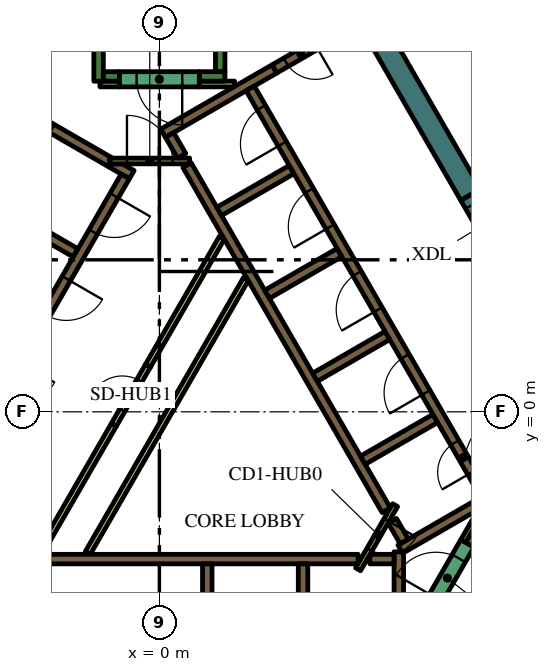
"""IFC4 building model, lengths in metres.
Left out: names, types, materials, properties, quantities, classifications, styles, units other than length and angle.
Written with IfcOpenShell. Run it as: python <this file> out.ifc"""

import sys

from ifc_helpers import new_model, si_unit, direction, frame, frame_2d, origin, place, context, subcontext, project, spatial, polyline, rectangle, outline, extrude, element, fill, save


model = new_model("IFC4")
c1 = context("Model", 3, precision=1e-05, world=origin(), true_north=direction((0.0, 1.0)))
c2 = subcontext(c1, "Body", "Model", "MODEL_VIEW")
j1 = project(units=[si_unit("LENGTHUNIT", "METRE"), si_unit("PLANEANGLEUNIT", "RADIAN")], contexts=[c1])
p1 = place(None, origin())
s1 = spatial("IfcSite", under=j1, at=p1, CompositionType="ELEMENT")
p2 = place(p1, origin())
s2 = spatial("IfcBuilding", under=s1, at=p2, CompositionType="ELEMENT")
p3 = place(p2, frame((0.0, 0.0, 304.8)))
s3 = spatial("IfcBuildingStorey", under=s2, at=p3, CompositionType="ELEMENT", Elevation=304.8)
p4 = place(p3, frame((8.192, 5.711, 0.0), z_axis=(0.0, 0.0, 1.0), x_axis=(-0.500006836656, 0.866021456604, 0.0)))
e1 = element("IfcWall", 1, at=p4, inside=s3, PredefinedType="SOLIDWALL", context=c2, shape_type="SweptSolid", body=[
    extrude(rectangle(XDim=5.078, YDim=0.6, at=frame_2d((2.539, 0.0))), origin(), (0.0, 0.0, 1.0), 4.2),
])
p5 = place(p3, frame((8.168, -3.503, 0.0), z_axis=(0.0, 0.0, 1.0), x_axis=(0.49972245349, 0.866185586049, 0.0)))
e2 = element("IfcWall", 2, at=p5, inside=s3, PredefinedType="SOLIDWALL", context=c2, shape_type="SweptSolid", body=[
    extrude(rectangle(XDim=0.425, YDim=0.25, at=frame_2d((0.212, 0.0))), origin(), (0.0, 0.0, 1.0), 4.2),
])
p6 = place(p3, frame((1.6, 8.95, 0.0), z_axis=(0.0, 0.0, 1.0), x_axis=(0.0, 1.0, 0.0)))
e3 = element("IfcWall", 3, at=p6, inside=s3, PredefinedType="SOLIDWALL", context=c2, shape_type="SweptSolid", body=[
    extrude(rectangle(XDim=6.8, YDim=0.25, at=frame_2d((3.4, 0.0))), origin(), (0.0, 0.0, 1.0), 4.2),
])
p7 = place(p3, frame((1.05, 8.825, 0.0), z_axis=(0.0, 0.0, 1.0), x_axis=(1.0, 0.0, 0.0)))
e4 = element("IfcWall", 4, at=p7, inside=s3, PredefinedType="SOLIDWALL", context=c2, shape_type="SweptSolid", body=[
    extrude(rectangle(XDim=0.675, YDim=0.25, at=frame_2d((0.337, 0.0))), origin(), (0.0, 0.0, 1.0), 4.2),
])
p8 = place(p3, frame((-1.6, 8.7, 0.0), z_axis=(0.0, 0.0, 1.0), x_axis=(0.0, 1.0, 0.0)))
e5 = element("IfcWall", 5, at=p8, inside=s3, PredefinedType="SOLIDWALL", context=c2, shape_type="SweptSolid", body=[
    extrude(rectangle(XDim=7.05, YDim=0.25, at=frame_2d((3.525, 0.0))), origin(), (0.0, 0.0, 1.0), 4.2),
])
p9 = place(p3, frame((-1.475, 8.825, 0.0), z_axis=(0.0, 0.0, 1.0), x_axis=(1.0, 0.0, 0.0)))
e6 = element("IfcWall", 6, at=p9, inside=s3, PredefinedType="SOLIDWALL", context=c2, shape_type="SweptSolid", body=[
    extrude(rectangle(XDim=0.425, YDim=0.25, at=frame_2d((0.212, 0.0))), origin(), (0.0, 0.0, 1.0), 4.2),
])
p10 = place(p3, frame((6.3, -7.24, 0.0), z_axis=(0.0, 0.0, 1.0), x_axis=(0.0, 1.0, 0.0)))
e7 = element("IfcWall", 7, at=p10, inside=s3, PredefinedType="SOLIDWALL", context=c2, shape_type="SweptSolid", body=[
    extrude(rectangle(XDim=3.556, YDim=0.25, at=frame_2d((1.778, 0.0))), origin(), (0.0, 0.0, 1.0), 4.2),
])
p11 = place(p3, frame((5.538, -3.875, 0.0), z_axis=(0.0, 0.0, 1.0), x_axis=(1.0, 0.0, 0.0)))
e8 = element("IfcWall", 8, at=p11, inside=s3, PredefinedType="SOLIDWALL", context=c2, shape_type="SweptSolid", body=[
    extrude(rectangle(XDim=0.637, YDim=0.25, at=frame_2d((0.318, 0.0))), origin(), (0.0, 0.0, 1.0), 4.2),
])
p12 = place(p3, frame((-5.259, -3.875, 0.0), z_axis=(0.0, 0.0, 1.0), x_axis=(1.0, 0.0, 0.0)))
e9 = element("IfcWall", 9, at=p12, inside=s3, PredefinedType="SOLIDWALL", context=c2, shape_type="SweptSolid", body=[
    extrude(rectangle(XDim=10.489, YDim=0.25, at=frame_2d((5.244, 0.0))), origin(), (0.0, 0.0, 1.0), 4.2),
])
for number, where, z_axis, x_axis in (
    (10, (1.26, -4.0, 0.0), (0.0, 0.0, 1.0), (0.0, -1.0, 0.0)),
    (11, (3.78, -4.0, 0.0), (0.0, 0.0, 1.0), (0.0, -1.0, 0.0)),
):
    element("IfcWall", number, at=place(p3, frame(where, z_axis=z_axis, x_axis=x_axis)), inside=s3, PredefinedType="SOLIDWALL", context=c2, shape_type="SweptSolid", body=[
        extrude(rectangle(XDim=2.2, YDim=0.25, at=frame_2d((1.1, 0.0))), origin(), (0.0, 0.0, 1.0), 4.2),
    ])
p13 = place(p3, frame((9.19, -1.969, 0.0), z_axis=(0.0, 0.0, 1.0), x_axis=(-0.866057109641, -0.499945079824, 0.0)))
e12 = element("IfcWall", 12, at=p13, inside=s3, PredefinedType="SOLIDWALL", context=c2, shape_type="SweptSolid", body=[
    extrude(rectangle(XDim=3.291, YDim=0.25, at=frame_2d((1.646, 0.0))), origin(), (0.0, 0.0, 1.0), 4.2),
])
p14 = place(p3, frame((6.13, -2.867, 0.0), z_axis=(0.0, 0.0, 1.0), x_axis=(0.500160776593, -0.865932559475, 0.0)))
e13 = element("IfcWall", 13, at=p14, inside=s3, PredefinedType="SOLIDWALL", context=c2, shape_type="SweptSolid", body=[
    extrude(rectangle(XDim=0.627, YDim=0.25, at=frame_2d((0.313, 0.0))), origin(), (0.0, 0.0, 1.0), 4.2),
])
p15 = place(p3, frame((3.028, 9.023, 0.0), z_axis=(0.0, 0.0, 1.0), x_axis=(-0.866036587186, -0.49998062928, 0.0)))
e14 = element("IfcWall", 14, at=p15, inside=s3, PredefinedType="SOLIDWALL", context=c2, shape_type="SweptSolid", body=[
    extrude(rectangle(XDim=3.384, YDim=0.25, at=frame_2d((1.692, 0.0))), origin(), (0.0, 0.0, 1.0), 4.2),
])
p16 = place(p3, frame((0.268, 7.285, 0.0), z_axis=(0.0, 0.0, 1.0), x_axis=(0.500098681536, -0.865968422476, 0.0)))
e15 = element("IfcWall", 15, at=p16, inside=s3, PredefinedType="SOLIDWALL", context=c2, shape_type="SweptSolid", body=[
    extrude(rectangle(XDim=0.636, YDim=0.25, at=frame_2d((0.318, 0.0))), origin(), (0.0, 0.0, 1.0), 4.2),
])
p17 = place(p3, frame((5.97, -2.591, 0.0), z_axis=(0.0, 0.0, 1.0), x_axis=(-0.499994469932, 0.866028596547, 0.0)))
e16 = element("IfcWall", 16, at=p17, inside=s3, PredefinedType="SOLIDWALL", context=c2, shape_type="SweptSolid", body=[
    extrude(rectangle(XDim=10.488, YDim=0.25, at=frame_2d((5.244, 0.0))), origin(), (0.0, 0.0, 1.0), 4.2),
])
p18 = place(p3, frame((1.574, 5.274, 0.0), z_axis=(0.0, 0.0, 1.0), x_axis=(0.866028486751, 0.499994660107, 0.0)))
e17 = element("IfcWall", 17, at=p18, inside=s3, PredefinedType="SOLIDWALL", context=c2, shape_type="SweptSolid", body=[
    extrude(rectangle(XDim=2.2, YDim=0.25, at=frame_2d((1.1, 0.0))), origin(), (0.0, 0.0, 1.0), 4.2),
])
for number, where, z_axis, x_axis in (
    (18, (2.834, 3.091, 0.0), (0.0, 0.0, 1.0), (0.866, 0.5, 0.0)),
    (19, (4.094, 0.909, 0.0), (0.0, 0.0, 1.0), (0.866, 0.5, 0.0)),
    (20, (5.354, -1.274, 0.0), (0.0, 0.0, 1.0), (0.866, 0.5, 0.0)),
):
    element("IfcWall", number, at=place(p3, frame(where, z_axis=z_axis, x_axis=x_axis)), inside=s3, PredefinedType="SOLIDWALL", context=c2, shape_type="SweptSolid", body=[
        extrude(rectangle(XDim=2.2, YDim=0.25, at=frame_2d((1.1, 0.0))), origin(), (0.0, 0.0, 1.0), 4.2),
    ])
p19 = place(p3, frame((-8.06, -1.311, 0.0), z_axis=(0.0, 0.0, 1.0), x_axis=(0.50000273126, 0.866023826885, 0.0)))
e21 = element("IfcWall", 21, at=p19, inside=s3, PredefinedType="SOLIDWALL", context=c2, shape_type="SweptSolid", body=[
    extrude(rectangle(XDim=10.33, YDim=0.25, at=frame_2d((5.165, 0.0))), origin(), (0.0, 0.0, 1.0), 4.2),
])
p20 = place(p3, origin())
e22 = element("IfcWall", 22, at=p20, inside=s3, PredefinedType="SOLIDWALL", context=c2, shape_type="SweptSolid", body=[
    extrude(outline(polyline([(-2.912, 7.356), (-2.787, 7.573), (-1.232, 6.675), (-1.303, 6.675), (-1.304, 6.675), (-1.304, 6.675), (-1.304, 6.525), (-1.304, 6.525), (-1.303, 6.525), (-0.971, 6.525), (-0.665, 6.348), (-0.79, 6.132), (-1.007, 6.257), (-1.007, 6.257), (-2.912, 7.356)])), origin(), (0.0, 0.0, 1.0), 4.2),
])
p21 = place(p3, frame((-2.204, 4.182, 0.0), z_axis=(0.0, 0.0, 1.0), x_axis=(-0.866008176907, 0.50002983664, 0.0)))
e23 = element("IfcWall", 23, at=p21, inside=s3, PredefinedType="SOLIDWALL", context=c2, shape_type="SweptSolid", body=[
    extrude(rectangle(XDim=2.2, YDim=0.25, at=frame_2d((1.1, 0.0))), origin(), (0.0, 0.0, 1.0), 4.2),
])
p22 = place(p3, frame((1.05, 8.625, 0.0), z_axis=(0.0, 0.0, 1.0), x_axis=(1.0, 0.0, 0.0)))
e24 = element("IfcWall", 24, at=p22, inside=s3, PredefinedType="PARTITIONING", context=c2, shape_type="SweptSolid", body=[
    extrude(rectangle(XDim=0.929, YDim=0.15, at=frame_2d((0.464, 0.0))), origin(), (0.0, 0.0, 1.0), 3.55),
])
p23 = place(p3, frame((-1.564, 8.625, 0.0), z_axis=(0.0, 0.0, 1.0), x_axis=(1.0, 0.0, 0.0)))
e25 = element("IfcWall", 25, at=p23, inside=s3, PredefinedType="PARTITIONING", context=c2, shape_type="SweptSolid", body=[
    extrude(rectangle(XDim=0.514, YDim=0.15, at=frame_2d((0.257, 0.0))), origin(), (0.0, 0.0, 1.0), 3.55),
])
p24 = place(p3, frame((8.459, -2.599, 0.0), z_axis=(0.0, 0.0, 1.0), x_axis=(-0.500041054325, -0.866001699761, 0.0)))
e26 = element("IfcWall", 26, at=p24, inside=s3, PredefinedType="PARTITIONING", context=c2, shape_type="SweptSolid", body=[
    extrude(rectangle(XDim=0.929, YDim=0.15, at=frame_2d((0.464, 0.0))), origin(), (0.0, 0.0, 1.0), 4.2),
])
p25 = place(p3, frame((-1.887, -3.718, 0.0), z_axis=(0.0, 0.0, 1.0), x_axis=(0.500005008002, 0.866022512394, 0.0)))
e27 = element("IfcWall", 27, at=p25, inside=s3, PredefinedType="PARTITIONING", context=c2, shape_type="SweptSolid", body=[
    extrude(rectangle(XDim=8.327, YDim=0.15, at=frame_2d((4.164, 0.0))), origin(), (0.0, 0.0, 1.0), 3.55),
])
p26 = place(p3, frame((-3.147, -3.718, 0.0), z_axis=(0.0, 0.0, 1.0), x_axis=(0.500010131483, 0.866019554291, 0.0)))
e28 = element("IfcWall", 28, at=p26, inside=s3, PredefinedType="PARTITIONING", context=c2, shape_type="SweptSolid", body=[
    extrude(rectangle(XDim=3.894, YDim=0.15, at=frame_2d((1.947, 0.0))), origin(), (0.0, 0.0, 1.0), 3.55),
])
p27 = place(p3, frame((-0.3, 1.212, 0.0), z_axis=(0.0, 0.0, 1.0), x_axis=(0.499963101113, 0.866046706318, 0.0)))
e29 = element("IfcWall", 29, at=p27, inside=s3, PredefinedType="PARTITIONING", context=c2, shape_type="SweptSolid", body=[
    extrude(rectangle(XDim=3.893, YDim=0.15, at=frame_2d((1.947, 0.0))), origin(), (0.0, 0.0, 1.0), 3.55),
])
p28 = place(p3, frame((8.565, -2.185, 0.0), z_axis=(0.0, 0.0, 1.0), x_axis=(-0.499997954832, 0.866026584559, 0.0)))
e30 = element("IfcWall", 30, at=p28, inside=s3, PredefinedType="SOLIDWALL", context=c2, shape_type="SweptSolid", body=[
    extrude(rectangle(XDim=12.35, YDim=0.25, at=frame_2d((6.175, 0.0))), origin(), (0.0, 0.0, 1.0), 4.2),
])
p29 = place(p28, frame((0.685, 0.0, 0.0)))
e31 = element("IfcOpeningElement", 31, at=p29, cuts=e30, PredefinedType="OPENING", context=c2, shape_type="SweptSolid", body=[
    extrude(rectangle(XDim=0.9, YDim=2.1, at=frame_2d((0.45, 1.05))), frame((0.0, 0.135, 0.0), z_axis=(0.0, -1.0, 0.0), x_axis=(1.0, 0.0, 0.0)), (0.0, 0.0, 1.0), 0.27),
])
p30 = place(p28, frame((3.105, 0.0, 0.0)))
e32 = element("IfcOpeningElement", 32, at=p30, cuts=e30, PredefinedType="OPENING", context=c2, shape_type="SweptSolid", body=[
    extrude(rectangle(XDim=1.1, YDim=2.1, at=frame_2d((0.55, 1.05))), frame((0.0, 0.135, 0.0), z_axis=(0.0, -1.0, 0.0), x_axis=(1.0, 0.0, 0.0)), (0.0, 0.0, 1.0), 0.27),
])
p31 = place(p28, frame((5.625, 0.0, 0.0)))
e33 = element("IfcOpeningElement", 33, at=p31, cuts=e30, PredefinedType="OPENING", context=c2, shape_type="SweptSolid", body=[
    extrude(rectangle(XDim=1.1, YDim=2.1, at=frame_2d((0.55, 1.05))), frame((0.0, 0.135, 0.0), z_axis=(0.0, -1.0, 0.0), x_axis=(1.0, 0.0, 0.0)), (0.0, 0.0, 1.0), 0.27),
])
p32 = place(p28, frame((8.145, 0.0, 0.0)))
e34 = element("IfcOpeningElement", 34, at=p32, cuts=e30, PredefinedType="OPENING", context=c2, shape_type="SweptSolid", body=[
    extrude(rectangle(XDim=1.1, YDim=2.1, at=frame_2d((0.55, 1.05))), frame((0.0, 0.135, 0.0), z_axis=(0.0, -1.0, 0.0), x_axis=(1.0, 0.0, 0.0)), (0.0, 0.0, 1.0), 0.27),
])
p33 = place(p28, frame((10.665, 0.0, 0.0)))
e35 = element("IfcOpeningElement", 35, at=p33, cuts=e30, PredefinedType="OPENING", context=c2, shape_type="SweptSolid", body=[
    extrude(rectangle(XDim=1.1, YDim=2.1, at=frame_2d((0.55, 1.05))), frame((0.0, 0.135, 0.0), z_axis=(0.0, -1.0, 0.0), x_axis=(1.0, 0.0, 0.0)), (0.0, 0.0, 1.0), 0.27),
])
p34 = place(p3, frame((-0.898, 6.194, 0.0), z_axis=(0.0, 0.0, 1.0), x_axis=(-0.499996202215, -0.866027596426, 0.0)))
e36 = element("IfcWall", 36, at=p34, inside=s3, PredefinedType="SOLIDWALL", context=c2, shape_type="SweptSolid", body=[
    extrude(rectangle(XDim=9.83, YDim=0.25, at=frame_2d((4.915, 0.0))), origin(), (0.0, 0.0, 1.0), 4.2),
])
p35 = place(p34, frame((0.585, 0.0, 0.0)))
e37 = element("IfcOpeningElement", 37, at=p35, cuts=e36, PredefinedType="OPENING", context=c2, shape_type="SweptSolid", body=[
    extrude(rectangle(XDim=1.1, YDim=2.1, at=frame_2d((0.55, 1.05))), frame((0.0, 0.135, 0.0), z_axis=(0.0, -1.0, 0.0), x_axis=(1.0, 0.0, 0.0)), (0.0, 0.0, 1.0), 0.27),
])
p36 = place(p34, frame((3.105, 0.0, 0.0)))
e38 = element("IfcOpeningElement", 38, at=p36, cuts=e36, PredefinedType="OPENING", context=c2, shape_type="SweptSolid", body=[
    extrude(rectangle(XDim=1.1, YDim=2.1, at=frame_2d((0.55, 1.05))), frame((0.0, 0.135, 0.0), z_axis=(0.0, -1.0, 0.0), x_axis=(1.0, 0.0, 0.0)), (0.0, 0.0, 1.0), 0.27),
])
p37 = place(p34, frame((5.625, 0.0, 0.0)))
e39 = element("IfcOpeningElement", 39, at=p37, cuts=e36, PredefinedType="OPENING", context=c2, shape_type="SweptSolid", body=[
    extrude(rectangle(XDim=1.1, YDim=2.1, at=frame_2d((0.55, 1.05))), frame((0.0, 0.135, 0.0), z_axis=(0.0, -1.0, 0.0), x_axis=(1.0, 0.0, 0.0)), (0.0, 0.0, 1.0), 0.27),
])
p38 = place(p34, frame((8.145, 0.0, 0.0)))
e40 = element("IfcOpeningElement", 40, at=p38, cuts=e36, PredefinedType="OPENING", context=c2, shape_type="SweptSolid", body=[
    extrude(rectangle(XDim=1.1, YDim=2.1, at=frame_2d((0.55, 1.05))), frame((0.0, 0.135, 0.0), z_axis=(0.0, -1.0, 0.0), x_axis=(1.0, 0.0, 0.0)), (0.0, 0.0, 1.0), 0.27),
])
p39 = place(p3, frame((7.053, -5.284, 0.0), z_axis=(0.0, 0.0, 1.0), x_axis=(0.500078061341, 0.865980330357, 0.0)))
e41 = element("IfcWall", 41, at=p39, inside=s3, PredefinedType="SOLIDWALL", context=c2, shape_type="SweptSolid", body=[
    extrude(rectangle(XDim=2.1, YDim=0.4, at=frame_2d((1.05, 0.0))), origin(), (0.0, 0.0, 1.0), 4.2),
])
p40 = place(p39, frame((0.45, 0.0, 0.0)))
e42 = element("IfcOpeningElement", 42, at=p40, cuts=e41, PredefinedType="OPENING", context=c2, shape_type="SweptSolid", body=[
    extrude(rectangle(XDim=1.2, YDim=2.1, at=frame_2d((0.6, 1.05))), frame((0.0, 0.21, 0.0), z_axis=(0.0, -1.0, 0.0), x_axis=(1.0, 0.0, 0.0)), (0.0, 0.0, 1.0), 0.42),
])
p41 = place(p3, frame((1.05, 8.75, 0.0), z_axis=(0.0, 0.0, 1.0), x_axis=(-1.0, 0.0, 0.0)))
e43 = element("IfcWall", 43, at=p41, inside=s3, PredefinedType="SOLIDWALL", context=c2, shape_type="SweptSolid", body=[
    extrude(rectangle(XDim=2.1, YDim=0.4, at=frame_2d((1.05, 0.0))), origin(), (0.0, 0.0, 1.0), 4.2),
])
p42 = place(p41, frame((0.45, 0.0, 0.0)))
e44 = element("IfcOpeningElement", 44, at=p42, cuts=e43, PredefinedType="OPENING", context=c2, shape_type="SweptSolid", body=[
    extrude(rectangle(XDim=1.2, YDim=2.1, at=frame_2d((0.6, 1.05))), frame((0.0, 0.21, 0.0), z_axis=(0.0, -1.0, 0.0), x_axis=(1.0, 0.0, 0.0)), (0.0, 0.0, 1.0), 0.42),
])
p43 = place(p3, frame((5.366, 10.373, 0.0), z_axis=(0.0, 0.0, 1.0), x_axis=(-0.866019956843, -0.50000943426, 0.0)))
e45 = element("IfcWall", 45, at=p43, inside=s3, PredefinedType="SOLIDWALL", context=c2, shape_type="SweptSolid", body=[
    extrude(rectangle(XDim=2.7, YDim=0.25, at=frame_2d((1.35, 0.0))), origin(), (0.0, 0.0, 1.0), 4.2),
])
p44 = place(p43, frame((1.45, 0.0, 0.0)))
e46 = element("IfcOpeningElement", 46, at=p44, cuts=e45, PredefinedType="OPENING", context=c2, shape_type="SweptSolid", body=[
    extrude(rectangle(XDim=0.9, YDim=2.1, at=frame_2d((0.45, 1.05))), frame((0.0, 0.135, 0.0), z_axis=(0.0, -1.0, 0.0), x_axis=(1.0, 0.0, 0.0)), (0.0, 0.0, 1.0), 0.27),
])
p45 = place(p3, frame((6.203, -2.456, 0.0), z_axis=(0.0, 0.0, 1.0), x_axis=(-0.500043961785, -0.866000020948, 0.0)))
e47 = element("IfcWall", 47, at=p45, inside=s3, PredefinedType="PARTITIONING", context=c2, shape_type="SweptSolid", body=[
    extrude(rectangle(XDim=1.95, YDim=0.15, at=frame_2d((0.975, 0.0))), origin(), (0.0, 0.0, 1.0), 4.2),
])
p46 = place(p45, frame((0.45, 0.0, 0.0)))
e48 = element("IfcOpeningElement", 48, at=p46, cuts=e47, PredefinedType="OPENING", context=c2, shape_type="SweptSolid", body=[
    extrude(rectangle(XDim=0.9, YDim=2.1, at=frame_2d((0.45, 1.05))), frame((0.0, 0.085, 0.0), z_axis=(0.0, -1.0, 0.0), x_axis=(1.0, 0.0, 0.0)), (0.0, 0.0, 1.0), 0.17),
])
p47 = place(p3, frame((-1.303, 6.6, 0.0), z_axis=(0.0, 0.0, 1.0), x_axis=(1.0, 0.0, 0.0)))
e49 = element("IfcWall", 49, at=p47, inside=s3, PredefinedType="PARTITIONING", context=c2, shape_type="SweptSolid", body=[
    extrude(rectangle(XDim=2.1, YDim=0.15, at=frame_2d((1.05, 0.0))), origin(), (0.0, 0.0, 1.0), 4.2),
])
p48 = place(p47, frame((0.45, 0.0, 0.0)))
e50 = element("IfcOpeningElement", 50, at=p48, cuts=e49, PredefinedType="OPENING", context=c2, shape_type="SweptSolid", body=[
    extrude(rectangle(XDim=1.2, YDim=2.1, at=frame_2d((0.6, 1.05))), frame((0.0, 0.085, 0.0), z_axis=(0.0, -1.0, 0.0), x_axis=(1.0, 0.0, 0.0)), (0.0, 0.0, 1.0), 0.17),
])
p49 = place(p3, frame((8.192, 5.711, 0.0), z_axis=(0.0, 0.0, 1.0), x_axis=(0.500062241894, -0.865989465428, 0.0)))
e51 = element("IfcWall", 51, at=p49, inside=s3, PredefinedType="SOLIDWALL", context=c2, shape_type="SweptSolid", body=[
    extrude(rectangle(XDim=1.7, YDim=0.6, at=frame_2d((0.85, 0.0))), origin(), (0.0, 0.0, 1.0), 4.2),
])
p50 = place(p49, frame((0.25, 0.0, 0.0)))
e52 = element("IfcOpeningElement", 52, at=p50, cuts=e51, PredefinedType="OPENING", context=c2, shape_type="SweptSolid", body=[
    extrude(rectangle(XDim=1.2, YDim=2.1, at=frame_2d((0.6, 1.05))), frame((0.0, 0.31, 0.0), z_axis=(0.0, -1.0, 0.0), x_axis=(1.0, 0.0, 0.0)), (0.0, 0.0, 1.0), 0.62),
])
p51 = place(p3, frame((-1.2, -0.346, 0.0), z_axis=(0.0, 0.0, 1.0), x_axis=(0.499961193289, 0.866047807691, 0.0)))
e53 = element("IfcWall", 53, at=p51, inside=s3, PredefinedType="PARTITIONING", context=c2, shape_type="SweptSolid", body=[
    extrude(rectangle(XDim=1.8, YDim=0.15, at=frame_2d((0.9, 0.0))), origin(), (0.0, 0.0, 1.0), 3.55),
])
p52 = place(p51, frame((0.45, 0.0, 0.0)))
e54 = element("IfcOpeningElement", 54, at=p52, cuts=e53, PredefinedType="OPENING", context=c2, shape_type="SweptSolid", body=[
    extrude(rectangle(XDim=0.9, YDim=2.1, at=frame_2d((0.45, 1.05))), frame((0.0, 0.085, 0.0), z_axis=(0.0, -1.0, 0.0), x_axis=(1.0, 0.0, 0.0)), (0.0, 0.0, 1.0), 0.17),
])
p53 = place(p3, frame((10.385, 6.112, 0.0), z_axis=(0.0, 0.0, 1.0), x_axis=(-0.499988222896, 0.866032203192, 0.0)))
e55 = element("IfcWall", 55, at=p53, inside=s3, PredefinedType="PARTITIONING", context=c2, shape_type="SweptSolid", body=[
    extrude(rectangle(XDim=4.4, YDim=0.2, at=frame_2d((2.2, 0.0))), origin(), (0.0, 0.0, 1.0), 3.55),
])
p54 = place(p29, origin())
e56 = element("IfcDoor", 56, at=p54, inside=s3, OperationType="SINGLE_SWING_LEFT", PredefinedType="DOOR", context=c2, shape_type="SweptSolid", body=[
    extrude(rectangle(XDim=0.9, YDim=2.1, at=frame_2d((0.45, 1.05))), frame((0.0, 0.025, 0.0), z_axis=(0.0, -1.0, 0.0), x_axis=(1.0, 0.0, 0.0)), (0.0, 0.0, 1.0), 0.05),
])
fill(e31, e56)
p55 = place(p30, origin())
e57 = element("IfcDoor", 57, at=p55, inside=s3, OperationType="DOUBLE_DOOR_SLIDING", PredefinedType="DOOR", context=c2, shape_type="SweptSolid", body=[
    extrude(rectangle(XDim=1.1, YDim=2.1, at=frame_2d((0.55, 1.05))), frame((0.0, 0.025, 0.0), z_axis=(0.0, -1.0, 0.0), x_axis=(1.0, 0.0, 0.0)), (0.0, 0.0, 1.0), 0.05),
])
fill(e32, e57)
p56 = place(p31, origin())
e58 = element("IfcDoor", 58, at=p56, inside=s3, OperationType="DOUBLE_DOOR_SLIDING", PredefinedType="DOOR", context=c2, shape_type="SweptSolid", body=[
    extrude(rectangle(XDim=1.1, YDim=2.1, at=frame_2d((0.55, 1.05))), frame((0.0, 0.025, 0.0), z_axis=(0.0, -1.0, 0.0), x_axis=(1.0, 0.0, 0.0)), (0.0, 0.0, 1.0), 0.05),
])
fill(e33, e58)
p57 = place(p32, origin())
e59 = element("IfcDoor", 59, at=p57, inside=s3, OperationType="DOUBLE_DOOR_SLIDING", PredefinedType="DOOR", context=c2, shape_type="SweptSolid", body=[
    extrude(rectangle(XDim=1.1, YDim=2.1, at=frame_2d((0.55, 1.05))), frame((0.0, 0.025, 0.0), z_axis=(0.0, -1.0, 0.0), x_axis=(1.0, 0.0, 0.0)), (0.0, 0.0, 1.0), 0.05),
])
fill(e34, e59)
p58 = place(p33, origin())
e60 = element("IfcDoor", 60, at=p58, inside=s3, OperationType="DOUBLE_DOOR_SLIDING", PredefinedType="DOOR", context=c2, shape_type="SweptSolid", body=[
    extrude(rectangle(XDim=1.1, YDim=2.1, at=frame_2d((0.55, 1.05))), frame((0.0, 0.025, 0.0), z_axis=(0.0, -1.0, 0.0), x_axis=(1.0, 0.0, 0.0)), (0.0, 0.0, 1.0), 0.05),
])
fill(e35, e60)
p59 = place(p35, origin())
e61 = element("IfcDoor", 61, at=p59, inside=s3, OperationType="DOUBLE_DOOR_SLIDING", PredefinedType="DOOR", context=c2, shape_type="SweptSolid", body=[
    extrude(rectangle(XDim=1.1, YDim=2.1, at=frame_2d((0.55, 1.05))), frame((0.0, 0.025, 0.0), z_axis=(0.0, -1.0, 0.0), x_axis=(1.0, 0.0, 0.0)), (0.0, 0.0, 1.0), 0.05),
])
fill(e37, e61)
p60 = place(p36, origin())
e62 = element("IfcDoor", 62, at=p60, inside=s3, OperationType="DOUBLE_DOOR_SLIDING", PredefinedType="DOOR", context=c2, shape_type="SweptSolid", body=[
    extrude(rectangle(XDim=1.1, YDim=2.1, at=frame_2d((0.55, 1.05))), frame((0.0, 0.025, 0.0), z_axis=(0.0, -1.0, 0.0), x_axis=(1.0, 0.0, 0.0)), (0.0, 0.0, 1.0), 0.05),
])
fill(e38, e62)
p61 = place(p40, origin())
e63 = element("IfcDoor", 63, at=p61, inside=s3, OperationType="SINGLE_SWING_LEFT", PredefinedType="DOOR", context=c2, shape_type="SweptSolid", body=[
    extrude(rectangle(XDim=1.2, YDim=2.1, at=frame_2d((0.6, 1.05))), frame((0.0, 0.025, 0.0), z_axis=(0.0, -1.0, 0.0), x_axis=(1.0, 0.0, 0.0)), (0.0, 0.0, 1.0), 0.05),
])
fill(e42, e63)
p62 = place(p42, origin())
e64 = element("IfcDoor", 64, at=p62, inside=s3, OperationType="SINGLE_SWING_LEFT", PredefinedType="DOOR", context=c2, shape_type="SweptSolid", body=[
    extrude(rectangle(XDim=1.2, YDim=2.1, at=frame_2d((0.6, 1.05))), frame((0.0, 0.025, 0.0), z_axis=(0.0, -1.0, 0.0), x_axis=(1.0, 0.0, 0.0)), (0.0, 0.0, 1.0), 0.05),
])
fill(e44, e64)
p63 = place(p44, origin())
e65 = element("IfcDoor", 65, at=p63, inside=s3, OperationType="SINGLE_SWING_LEFT", PredefinedType="DOOR", context=c2, shape_type="SweptSolid", body=[
    extrude(rectangle(XDim=0.9, YDim=2.1, at=frame_2d((0.45, 1.05))), frame((0.0, 0.025, 0.0), z_axis=(0.0, -1.0, 0.0), x_axis=(1.0, 0.0, 0.0)), (0.0, 0.0, 1.0), 0.05),
])
fill(e46, e65)
p64 = place(p46, origin())
e66 = element("IfcDoor", 66, at=p64, inside=s3, OperationType="SINGLE_SWING_LEFT", PredefinedType="DOOR", context=c2, shape_type="SweptSolid", body=[
    extrude(rectangle(XDim=0.9, YDim=2.1, at=frame_2d((0.45, 1.05))), frame((0.0, 0.025, 0.0), z_axis=(0.0, -1.0, 0.0), x_axis=(1.0, 0.0, 0.0)), (0.0, 0.0, 1.0), 0.05),
])
fill(e48, e66)
p65 = place(p48, origin())
e67 = element("IfcDoor", 67, at=p65, inside=s3, OperationType="SINGLE_SWING_LEFT", PredefinedType="DOOR", context=c2, shape_type="SweptSolid", body=[
    extrude(rectangle(XDim=1.2, YDim=2.1, at=frame_2d((0.6, 1.05))), frame((0.0, 0.025, 0.0), z_axis=(0.0, -1.0, 0.0), x_axis=(1.0, 0.0, 0.0)), (0.0, 0.0, 1.0), 0.05),
])
fill(e50, e67)
p66 = place(p52, origin())
e68 = element("IfcDoor", 68, at=p66, inside=s3, OperationType="SINGLE_SWING_LEFT", PredefinedType="DOOR", context=c2, shape_type="SweptSolid", body=[
    extrude(rectangle(XDim=0.9, YDim=2.1, at=frame_2d((0.45, 1.05))), frame((0.0, 0.025, 0.0), z_axis=(0.0, -1.0, 0.0), x_axis=(1.0, 0.0, 0.0)), (0.0, 0.0, 1.0), 0.05),
])
fill(e54, e68)
save(model, sys.argv[1])
